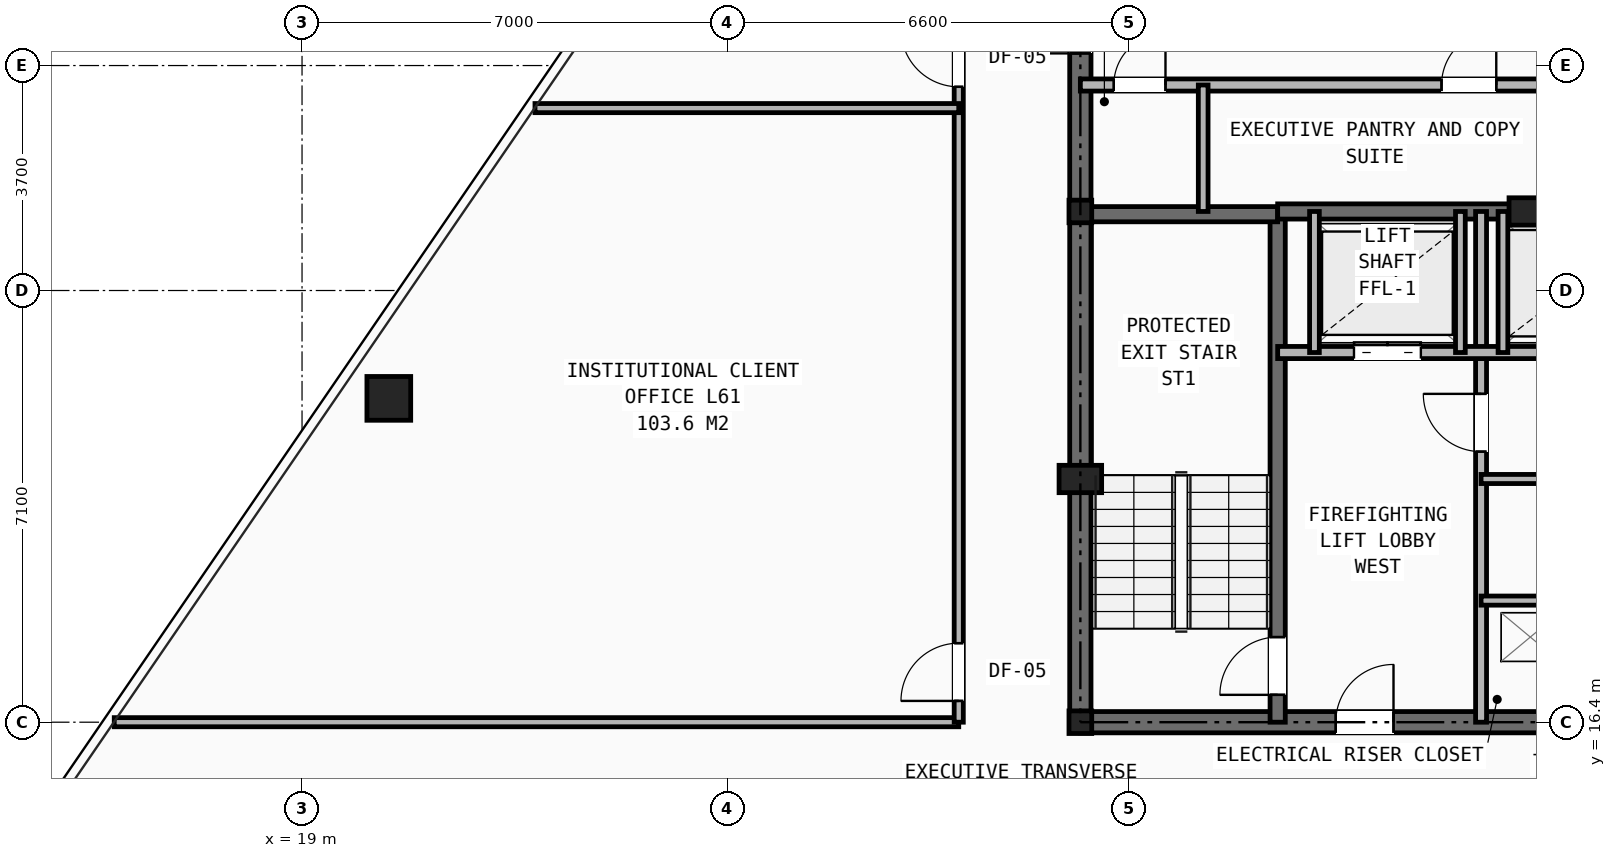
"""IFC4 building model, lengths in metres.
Left out: names, types, materials, properties, quantities, classifications, styles, units other than length and angle.
Written with IfcOpenShell. Run it as: python <this file> out.ifc"""

import sys

from ifc_helpers import new_model, si_unit, direction, frame, frame_2d, origin, origin_2d, place, context, subcontext, project, spatial, rectangle, hollow_rectangle, i_section, extrude, element, fill, save


model = new_model("IFC4")
c1 = context("Model", 3, precision=1e-05, world=origin(), true_north=direction((0.0, 1.0)))
c2 = subcontext(c1, "Body", "Model", "MODEL_VIEW")
j1 = project(units=[si_unit("LENGTHUNIT", "METRE"), si_unit("PLANEANGLEUNIT", "RADIAN")], contexts=[c1])
p1 = place(None, origin())
s1 = spatial("IfcSite", under=j1, at=p1, CompositionType="ELEMENT")
p2 = place(p1, origin())
s2 = spatial("IfcBuilding", under=s1, at=p2, CompositionType="ELEMENT")
p3 = place(p2, frame((0.0, 0.0, 215.4)))
s3 = spatial("IfcBuildingStorey", under=s2, at=p3, CompositionType="ELEMENT", Elevation=215.4)
for number, where, z_axis, x_axis in (
    (1, (31.8, 16.4, 0.0), (0.0, 0.0, 1.0), (1.0, 0.0, 0.0)),
    (2, (31.8, 24.8, 0.0), (0.0, 0.0, 1.0), (1.0, 0.0, 0.0)),
):
    element("IfcColumn", number, at=place(p3, frame(where, z_axis=z_axis, x_axis=x_axis)), inside=s3, PredefinedType="COLUMN", context=c2, shape_type="SweptSolid", body=[
        extrude(i_section(OverallWidth=0.374, OverallDepth=0.372, WebThickness=0.016, FlangeThickness=0.026, at=origin_2d()), origin(), (0.0, 0.0, 1.0), 3.5),
    ])
for number, where, z_axis, x_axis in (
    (3, (31.8, 20.4, 0.0), (0.0, 0.0, 1.0), (1.0, 0.0, 0.0)),
    (4, (39.2, 24.8, 0.0), (0.0, 0.0, 1.0), (1.0, 0.0, 0.0)),
):
    element("IfcColumn", number, at=place(p3, frame(where, z_axis=z_axis, x_axis=x_axis)), inside=s3, PredefinedType="PILASTER", context=c2, shape_type="SweptSolid", body=[
        extrude(rectangle(XDim=0.7, YDim=0.45, at=origin_2d()), origin(), (0.0, 0.0, 1.0), 3.5),
    ])
p4 = place(p3, frame((20.427, 21.726, 0.0), z_axis=(0.0, 0.0, 1.0), x_axis=(1.0, 0.0, 0.0)))
e5 = element("IfcColumn", 5, at=p4, inside=s3, PredefinedType="COLUMN", context=c2, shape_type="SweptSolid", body=[
    extrude(hollow_rectangle(XDim=0.72, YDim=0.72, WallThickness=0.05, at=origin_2d()), origin(), (0.0, 0.0, 1.0), 3.5),
])
p5 = place(p3, frame((31.8, 16.4, 0.0), z_axis=(0.0, 0.0, 1.0), x_axis=(1.0, 0.0, 0.0)))
e6 = element("IfcWall", 6, at=p5, inside=s3, PredefinedType="SHEAR", context=c2, shape_type="SweptSolid", body=[
    extrude(rectangle(XDim=16.4, YDim=0.35, at=frame_2d((8.2, 0.0))), origin(), (0.0, 0.0, 1.0), 3.25),
])
p6 = place(p5, frame((7.75, 0.0, 0.0)))
e7 = element("IfcOpeningElement", 7, at=p6, cuts=e6, PredefinedType="OPENING", context=c2, shape_type="SweptSolid", body=[
    extrude(rectangle(XDim=0.9, YDim=2.1, at=frame_2d((0.45, 1.05))), frame((0.0, 0.185, 0.0), z_axis=(0.0, -1.0, 0.0), x_axis=(1.0, 0.0, 0.0)), (0.0, 0.0, 1.0), 0.37),
])
p7 = place(p5, frame((4.2, 0.0, 0.0)))
e8 = element("IfcOpeningElement", 8, at=p7, cuts=e6, PredefinedType="OPENING", context=c2, shape_type="SweptSolid", body=[
    extrude(rectangle(XDim=0.95, YDim=2.1, at=frame_2d((0.475, 1.05))), frame((0.0, 0.185, 0.0), z_axis=(0.0, -1.0, 0.0), x_axis=(1.0, 0.0, 0.0)), (0.0, 0.0, 1.0), 0.37),
])
p8 = place(p5, frame((10.6, 0.0, 0.0)))
e9 = element("IfcOpeningElement", 9, at=p8, cuts=e6, PredefinedType="OPENING", context=c2, shape_type="SweptSolid", body=[
    extrude(rectangle(XDim=0.95, YDim=2.1, at=frame_2d((0.475, 1.05))), frame((0.0, 0.185, 0.0), z_axis=(0.0, -1.0, 0.0), x_axis=(1.0, 0.0, 0.0)), (0.0, 0.0, 1.0), 0.37),
])
p9 = place(p3, frame((31.8, 16.4, 0.0), z_axis=(0.0, 0.0, 1.0), x_axis=(0.0, 1.0, 0.0)))
e10 = element("IfcWall", 10, at=p9, inside=s3, PredefinedType="SHEAR", context=c2, shape_type="SweptSolid", body=[
    extrude(rectangle(XDim=14.8, YDim=0.35, at=frame_2d((7.4, 0.0))), origin(), (0.0, 0.0, 1.0), 3.25),
])
p10 = place(p9, frame((11.0, 0.0, 0.0)))
e11 = element("IfcOpeningElement", 11, at=p10, cuts=e10, PredefinedType="OPENING", context=c2, shape_type="SweptSolid", body=[
    extrude(rectangle(XDim=1.1, YDim=2.15, at=frame_2d((0.55, 1.075))), frame((0.0, 0.185, 0.0), z_axis=(0.0, -1.0, 0.0), x_axis=(1.0, 0.0, 0.0)), (0.0, 0.0, 1.0), 0.37),
])
p11 = place(p3, frame((35.045, 16.4, 0.0), z_axis=(0.0, 0.0, 1.0), x_axis=(0.0, 1.0, 0.0)))
e12 = element("IfcWall", 12, at=p11, inside=s3, PredefinedType="SHEAR", context=c2, shape_type="SweptSolid", body=[
    extrude(rectangle(XDim=8.4, YDim=0.25, at=frame_2d((4.2, 0.0))), origin(), (0.0, 0.0, 1.0), 3.25),
])
p12 = place(p11, frame((0.45, 0.0, 0.0)))
e13 = element("IfcOpeningElement", 13, at=p12, cuts=e12, PredefinedType="OPENING", context=c2, shape_type="SweptSolid", body=[
    extrude(rectangle(XDim=0.95, YDim=2.1, at=frame_2d((0.475, 1.05))), frame((0.0, 0.135, 0.0), z_axis=(0.0, -1.0, 0.0), x_axis=(1.0, 0.0, 0.0)), (0.0, 0.0, 1.0), 0.27),
])
p13 = place(p3, frame((31.8, 24.755, 0.0), z_axis=(0.0, 0.0, 1.0), x_axis=(1.0, 0.0, 0.0)))
e14 = element("IfcWall", 14, at=p13, inside=s3, PredefinedType="SHEAR", context=c2, shape_type="SweptSolid", body=[
    extrude(rectangle(XDim=3.245, YDim=0.25, at=frame_2d((1.623, 0.0))), origin(), (0.0, 0.0, 1.0), 3.25),
])
p14 = place(p3, frame((35.045, 24.8, 0.0), z_axis=(0.0, 0.0, 1.0), x_axis=(1.0, 0.0, 0.0)))
e15 = element("IfcWall", 15, at=p14, inside=s3, PredefinedType="SHEAR", context=c2, shape_type="SweptSolid", body=[
    extrude(rectangle(XDim=9.91, YDim=0.25, at=frame_2d((4.955, 0.0))), origin(), (0.0, 0.0, 1.0), 3.25),
])
p15 = place(p3, frame((38.39, 16.4, 0.0), z_axis=(0.0, 0.0, 1.0), x_axis=(0.0, 1.0, 0.0)))
e16 = element("IfcWall", 16, at=p15, inside=s3, PredefinedType="PARTITIONING", context=c2, shape_type="SweptSolid", body=[
    extrude(rectangle(XDim=8.4, YDim=0.18, at=frame_2d((4.2, 0.0))), origin(), (0.0, 0.0, 1.0), 2.705),
])
p16 = place(p15, frame((4.45, 0.0, 0.0)))
e17 = element("IfcOpeningElement", 17, at=p16, cuts=e16, PredefinedType="OPENING", context=c2, shape_type="SweptSolid", body=[
    extrude(rectangle(XDim=0.95, YDim=2.1, at=frame_2d((0.475, 1.05))), frame((0.0, 0.1, 0.0), z_axis=(0.0, -1.0, 0.0), x_axis=(1.0, 0.0, 0.0)), (0.0, 0.0, 1.0), 0.2),
])
p17 = place(p3, frame((35.045, 22.48, 0.0), z_axis=(0.0, 0.0, 1.0), x_axis=(1.0, 0.0, 0.0)))
e18 = element("IfcWall", 18, at=p17, inside=s3, PredefinedType="SOLIDWALL", context=c2, shape_type="SweptSolid", body=[
    extrude(rectangle(XDim=9.91, YDim=0.2, at=frame_2d((4.955, 0.0))), origin(), (0.0, 0.0, 1.0), 3.25),
])
p18 = place(p17, frame((1.255, 0.0, 0.0)))
e19 = element("IfcOpeningElement", 19, at=p18, cuts=e18, PredefinedType="OPENING", context=c2, shape_type="SweptSolid", body=[
    extrude(rectangle(XDim=1.1, YDim=2.15, at=frame_2d((0.55, 1.075))), frame((0.0, 0.11, 0.0), z_axis=(0.0, -1.0, 0.0), x_axis=(1.0, 0.0, 0.0)), (0.0, 0.0, 1.0), 0.22),
])
p19 = place(p17, frame((7.555, 0.0, 0.0)))
e20 = element("IfcOpeningElement", 20, at=p19, cuts=e18, PredefinedType="OPENING", context=c2, shape_type="SweptSolid", body=[
    extrude(rectangle(XDim=1.1, YDim=2.15, at=frame_2d((0.55, 1.075))), frame((0.0, 0.11, 0.0), z_axis=(0.0, -1.0, 0.0), x_axis=(1.0, 0.0, 0.0)), (0.0, 0.0, 1.0), 0.22),
])
p20 = place(p17, frame((4.405, 0.0, 0.0)))
e21 = element("IfcOpeningElement", 21, at=p20, cuts=e18, PredefinedType="OPENING", context=c2, shape_type="SweptSolid", body=[
    extrude(rectangle(XDim=1.1, YDim=2.15, at=frame_2d((0.55, 1.075))), frame((0.0, 0.11, 0.0), z_axis=(0.0, -1.0, 0.0), x_axis=(1.0, 0.0, 0.0)), (0.0, 0.0, 1.0), 0.22),
])
for number, where, z_axis, x_axis in (
    (22, (38.39, 18.4, 0.0), (0.0, 0.0, 1.0), (1.0, 0.0, 0.0)),
    (23, (38.39, 20.4, 0.0), (0.0, 0.0, 1.0), (1.0, 0.0, 0.0)),
):
    element("IfcWall", number, at=place(p3, frame(where, z_axis=z_axis, x_axis=x_axis)), inside=s3, PredefinedType="PARTITIONING", context=c2, shape_type="SweptSolid", body=[
        extrude(rectangle(XDim=3.22, YDim=0.15, at=frame_2d((1.61, 0.0))), origin(), (0.0, 0.0, 1.0), 3.25),
    ])
for number, where, z_axis, x_axis in (
    (24, (35.65, 22.48, 0.0), (0.0, 0.0, 1.0), (0.0, 1.0, 0.0)),
    (25, (38.05, 22.48, 0.0), (0.0, 0.0, 1.0), (0.0, 1.0, 0.0)),
    (26, (38.75, 22.48, 0.0), (0.0, 0.0, 1.0), (0.0, 1.0, 0.0)),
):
    element("IfcWall", number, at=place(p3, frame(where, z_axis=z_axis, x_axis=x_axis)), inside=s3, PredefinedType="SOLIDWALL", context=c2, shape_type="SweptSolid", body=[
        extrude(rectangle(XDim=2.32, YDim=0.16, at=frame_2d((1.16, 0.0))), origin(), (0.0, 0.0, 1.0), 3.25),
    ])
p21 = place(p3, frame((31.8, 26.88, 0.0), z_axis=(0.0, 0.0, 1.0), x_axis=(1.0, 0.0, 0.0)))
e27 = element("IfcWall", 27, at=p21, inside=s3, PredefinedType="SOLIDWALL", context=c2, shape_type="SweptSolid", body=[
    extrude(rectangle(XDim=16.4, YDim=0.2, at=frame_2d((8.2, 0.0))), origin(), (0.0, 0.0, 1.0), 2.705),
])
p22 = place(p21, frame((0.55, 0.0, 0.0)))
e28 = element("IfcOpeningElement", 28, at=p22, cuts=e27, PredefinedType="OPENING", context=c2, shape_type="SweptSolid", body=[
    extrude(rectangle(XDim=0.85, YDim=2.05, at=frame_2d((0.425, 1.025))), frame((0.0, 0.11, 0.0), z_axis=(0.0, -1.0, 0.0), x_axis=(1.0, 0.0, 0.0)), (0.0, 0.0, 1.0), 0.22),
])
p23 = place(p21, frame((5.94, 0.0, 0.0)))
e29 = element("IfcOpeningElement", 29, at=p23, cuts=e27, PredefinedType="OPENING", context=c2, shape_type="SweptSolid", body=[
    extrude(rectangle(XDim=0.9, YDim=2.1, at=frame_2d((0.45, 1.05))), frame((0.0, 0.11, 0.0), z_axis=(0.0, -1.0, 0.0), x_axis=(1.0, 0.0, 0.0)), (0.0, 0.0, 1.0), 0.22),
])
p24 = place(p21, frame((11.41, 0.0, 0.0)))
e30 = element("IfcOpeningElement", 30, at=p24, cuts=e27, PredefinedType="OPENING", context=c2, shape_type="SweptSolid", body=[
    extrude(rectangle(XDim=1.1, YDim=2.15, at=frame_2d((0.55, 1.075))), frame((0.0, 0.11, 0.0), z_axis=(0.0, -1.0, 0.0), x_axis=(1.0, 0.0, 0.0)), (0.0, 0.0, 1.0), 0.22),
])
p25 = place(p21, frame((13.73, 0.0, 0.0)))
e31 = element("IfcOpeningElement", 31, at=p25, cuts=e27, PredefinedType="OPENING", context=c2, shape_type="SweptSolid", body=[
    extrude(rectangle(XDim=1.1, YDim=2.15, at=frame_2d((0.55, 1.075))), frame((0.0, 0.11, 0.0), z_axis=(0.0, -1.0, 0.0), x_axis=(1.0, 0.0, 0.0)), (0.0, 0.0, 1.0), 0.22),
])
p26 = place(p3, frame((33.82, 24.8, 0.0), z_axis=(0.0, 0.0, 1.0), x_axis=(0.0, 1.0, 0.0)))
e32 = element("IfcWall", 32, at=p26, inside=s3, PredefinedType="SOLIDWALL", context=c2, shape_type="SweptSolid", body=[
    extrude(rectangle(XDim=2.08, YDim=0.16, at=frame_2d((1.04, 0.0))), origin(), (0.0, 0.0, 1.0), 3.25),
])
p27 = place(p3, frame((15.912, 16.4, 0.0), z_axis=(0.0, 0.0, 1.0), x_axis=(1.0, 0.0, 0.0)))
e33 = element("IfcWall", 33, at=p27, inside=s3, PredefinedType="PARTITIONING", context=c2, shape_type="SweptSolid", body=[
    extrude(rectangle(XDim=13.888, YDim=0.15, at=frame_2d((6.944, 0.0))), origin(), (0.0, 0.0, 1.0), 2.292),
])
p28 = place(p3, frame((29.8, 16.4, 0.0), z_axis=(0.0, 0.0, 1.0), x_axis=(0.0, 1.0, 0.0)))
e34 = element("IfcWall", 34, at=p28, inside=s3, PredefinedType="PARTITIONING", context=c2, shape_type="SweptSolid", body=[
    extrude(rectangle(XDim=19.3, YDim=0.15, at=frame_2d((9.65, 0.0))), origin(), (0.0, 0.0, 1.0), 2.292),
])
p29 = place(p28, frame((0.35, 0.0, 0.0)))
e35 = element("IfcOpeningElement", 35, at=p29, cuts=e34, PredefinedType="OPENING", context=c2, shape_type="SweptSolid", body=[
    extrude(rectangle(XDim=0.95, YDim=2.1, at=frame_2d((0.475, 1.05))), frame((0.0, 0.085, 0.0), z_axis=(0.0, -1.0, 0.0), x_axis=(1.0, 0.0, 0.0)), (0.0, 0.0, 1.0), 0.17),
])
p30 = place(p28, frame((10.45, 0.0, 0.0)))
e36 = element("IfcOpeningElement", 36, at=p30, cuts=e34, PredefinedType="OPENING", context=c2, shape_type="SweptSolid", body=[
    extrude(rectangle(XDim=0.95, YDim=2.1, at=frame_2d((0.475, 1.05))), frame((0.0, 0.085, 0.0), z_axis=(0.0, -1.0, 0.0), x_axis=(1.0, 0.0, 0.0)), (0.0, 0.0, 1.0), 0.17),
])
p31 = place(p3, frame((22.831, 26.5, 0.0), z_axis=(0.0, 0.0, 1.0), x_axis=(1.0, 0.0, 0.0)))
e37 = element("IfcWall", 37, at=p31, inside=s3, PredefinedType="PARTITIONING", context=c2, shape_type="SweptSolid", body=[
    extrude(rectangle(XDim=6.969, YDim=0.15, at=frame_2d((3.484, 0.0))), origin(), (0.0, 0.0, 1.0), 2.628),
])
p32 = place(p16, origin())
e38 = element("IfcDoor", 38, at=p32, inside=s3, OperationType="SINGLE_SWING_RIGHT", PredefinedType="DOOR", context=c2, shape_type="SweptSolid", body=[
    extrude(rectangle(XDim=0.95, YDim=2.1, at=frame_2d((0.475, 1.05))), frame((0.0, 0.025, 0.0), z_axis=(0.0, -1.0, 0.0), x_axis=(1.0, 0.0, 0.0)), (0.0, 0.0, 1.0), 0.05),
])
fill(e17, e38)
p33 = place(p12, origin())
e39 = element("IfcDoor", 39, at=p33, inside=s3, OperationType="SINGLE_SWING_LEFT", PredefinedType="DOOR", context=c2, shape_type="SweptSolid", body=[
    extrude(rectangle(XDim=0.95, YDim=2.1, at=frame_2d((0.475, 1.05))), frame((0.0, 0.025, 0.0), z_axis=(0.0, -1.0, 0.0), x_axis=(1.0, 0.0, 0.0)), (0.0, 0.0, 1.0), 0.05),
])
fill(e13, e39)
p34 = place(p7, origin())
e40 = element("IfcDoor", 40, at=p34, inside=s3, OperationType="SINGLE_SWING_RIGHT", PredefinedType="DOOR", context=c2, shape_type="SweptSolid", body=[
    extrude(rectangle(XDim=0.95, YDim=2.1, at=frame_2d((0.475, 1.05))), frame((0.0, 0.025, 0.0), z_axis=(0.0, -1.0, 0.0), x_axis=(1.0, 0.0, 0.0)), (0.0, 0.0, 1.0), 0.05),
])
fill(e8, e40)
p35 = place(p18, origin())
e41 = element("IfcDoor", 41, at=p35, inside=s3, OperationType="DOUBLE_DOOR_SLIDING", PredefinedType="DOOR", context=c2, shape_type="SweptSolid", body=[
    extrude(rectangle(XDim=1.1, YDim=2.15, at=frame_2d((0.55, 1.075))), frame((0.0, 0.025, 0.0), z_axis=(0.0, -1.0, 0.0), x_axis=(1.0, 0.0, 0.0)), (0.0, 0.0, 1.0), 0.05),
])
fill(e19, e41)
p36 = place(p22, origin())
e42 = element("IfcDoor", 42, at=p36, inside=s3, OperationType="SINGLE_SWING_RIGHT", PredefinedType="DOOR", context=c2, shape_type="SweptSolid", body=[
    extrude(rectangle(XDim=0.85, YDim=2.05, at=frame_2d((0.425, 1.025))), frame((0.0, 0.025, 0.0), z_axis=(0.0, -1.0, 0.0), x_axis=(1.0, 0.0, 0.0)), (0.0, 0.0, 1.0), 0.05),
])
fill(e28, e42)
p37 = place(p10, origin())
e43 = element("IfcDoor", 43, at=p37, inside=s3, OperationType="SINGLE_SWING_LEFT", PredefinedType="DOOR", context=c2, shape_type="SweptSolid", body=[
    extrude(rectangle(XDim=1.1, YDim=2.15, at=frame_2d((0.55, 1.075))), frame((0.0, 0.025, 0.0), z_axis=(0.0, -1.0, 0.0), x_axis=(1.0, 0.0, 0.0)), (0.0, 0.0, 1.0), 0.05),
])
fill(e11, e43)
p38 = place(p23, origin())
e44 = element("IfcDoor", 44, at=p38, inside=s3, OperationType="SINGLE_SWING_RIGHT", PredefinedType="DOOR", context=c2, shape_type="SweptSolid", body=[
    extrude(rectangle(XDim=0.9, YDim=2.1, at=frame_2d((0.45, 1.05))), frame((0.0, 0.025, 0.0), z_axis=(0.0, -1.0, 0.0), x_axis=(1.0, 0.0, 0.0)), (0.0, 0.0, 1.0), 0.05),
])
fill(e29, e44)
p39 = place(p29, origin())
e45 = element("IfcDoor", 45, at=p39, inside=s3, OperationType="SINGLE_SWING_LEFT", PredefinedType="DOOR", context=c2, shape_type="SweptSolid", body=[
    extrude(rectangle(XDim=0.95, YDim=2.1, at=frame_2d((0.475, 1.05))), frame((0.0, 0.025, 0.0), z_axis=(0.0, -1.0, 0.0), x_axis=(1.0, 0.0, 0.0)), (0.0, 0.0, 1.0), 0.05),
])
fill(e35, e45)
p40 = place(p30, origin())
e46 = element("IfcDoor", 46, at=p40, inside=s3, OperationType="SINGLE_SWING_RIGHT", PredefinedType="DOOR", context=c2, shape_type="SweptSolid", body=[
    extrude(rectangle(XDim=0.95, YDim=2.1, at=frame_2d((0.475, 1.05))), frame((0.0, 0.025, 0.0), z_axis=(0.0, -1.0, 0.0), x_axis=(1.0, 0.0, 0.0)), (0.0, 0.0, 1.0), 0.05),
])
fill(e36, e46)
save(model, sys.argv[1])
